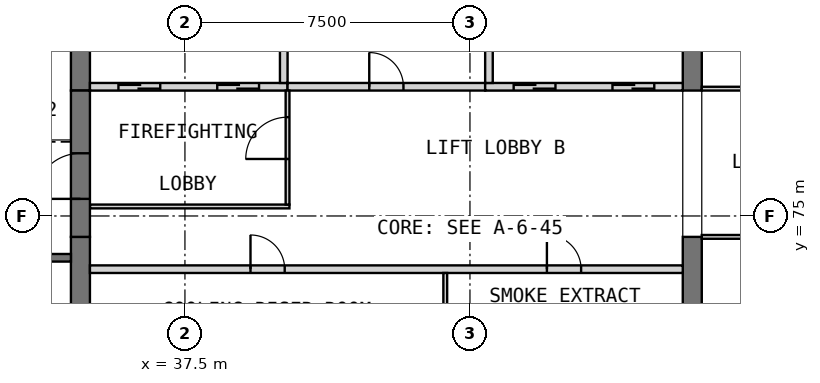
"""IFC4 building model, lengths in metres.
Left out: names, types, materials, properties, quantities, classifications, styles, units other than length and angle.
Written with IfcOpenShell. Run it as: python <this file> out.ifc"""

import sys

from ifc_helpers import new_model, si_unit, direction, frame, frame_2d, origin, place, context, subcontext, project, spatial, rectangle, extrude, element, fill, save


model = new_model("IFC4")
c1 = context("Model", 3, precision=1e-05, world=origin(), true_north=direction((0.0, 1.0)))
c2 = subcontext(c1, "Body", "Model", "MODEL_VIEW")
j1 = project(units=[si_unit("LENGTHUNIT", "METRE"), si_unit("PLANEANGLEUNIT", "RADIAN")], contexts=[c1])
p1 = place(None, origin())
s1 = spatial("IfcSite", under=j1, at=p1, CompositionType="ELEMENT")
p2 = place(p1, origin())
s2 = spatial("IfcBuilding", under=s1, at=p2, CompositionType="ELEMENT")
p3 = place(p2, frame((0.0, 0.0, 320.2)))
s3 = spatial("IfcBuildingStorey", under=s2, at=p3, CompositionType="ELEMENT", Elevation=320.2)
p4 = place(p3, frame((34.75, 68.05, 0.0), z_axis=(0.0, 0.0, 1.0), x_axis=(0.0, 1.0, 0.0)))
e1 = element("IfcWall", 1, at=p4, inside=s3, PredefinedType="SHEAR", context=c2, shape_type="SweptSolid", body=[
    extrude(rectangle(XDim=6.4, YDim=0.5, at=frame_2d((3.2, 0.0))), origin(), (0.0, 0.0, 1.0), 7.7),
])
p5 = place(p3, frame((34.75, 78.3, 0.0), z_axis=(0.0, 0.0, 1.0), x_axis=(0.0, 1.0, 0.0)))
e2 = element("IfcWall", 2, at=p5, inside=s3, PredefinedType="SHEAR", context=c2, shape_type="SweptSolid", body=[
    extrude(rectangle(XDim=3.6, YDim=0.5, at=frame_2d((1.8, 0.0))), origin(), (0.0, 0.0, 1.0), 7.7),
])
p6 = place(p3, frame((50.85, 68.05, 0.0), z_axis=(0.0, 0.0, 1.0), x_axis=(0.0, 1.0, 0.0)))
e3 = element("IfcWall", 3, at=p6, inside=s3, PredefinedType="SHEAR", context=c2, shape_type="SweptSolid", body=[
    extrude(rectangle(XDim=6.4, YDim=0.5, at=frame_2d((3.2, 0.0))), origin(), (0.0, 0.0, 1.0), 7.7),
])
p7 = place(p3, frame((50.85, 78.3, 0.0), z_axis=(0.0, 0.0, 1.0), x_axis=(0.0, 1.0, 0.0)))
e4 = element("IfcWall", 4, at=p7, inside=s3, PredefinedType="SHEAR", context=c2, shape_type="SweptSolid", body=[
    extrude(rectangle(XDim=3.6, YDim=0.5, at=frame_2d((1.8, 0.0))), origin(), (0.0, 0.0, 1.0), 7.7),
])
p8 = place(p3, frame((35.0, 73.6, 0.0), z_axis=(0.0, 0.0, 1.0), x_axis=(1.0, 0.0, 0.0)))
e5 = element("IfcWall", 5, at=p8, inside=s3, PredefinedType="PARTITIONING", context=c2, shape_type="SweptSolid", body=[
    extrude(rectangle(XDim=15.6, YDim=0.2, at=frame_2d((7.8, 0.0))), origin(), (0.0, 0.0, 1.0), 7.7),
])
p9 = place(p8, frame((4.225, 0.0, 0.0)))
e6 = element("IfcOpeningElement", 6, at=p9, cuts=e5, PredefinedType="OPENING", context=c2, shape_type="SweptSolid", body=[
    extrude(rectangle(XDim=0.9, YDim=2.1, at=frame_2d((0.45, 1.05))), frame((0.0, 0.11, 0.0), z_axis=(0.0, -1.0, 0.0), x_axis=(1.0, 0.0, 0.0)), (0.0, 0.0, 1.0), 0.22),
])
p10 = place(p8, frame((12.025, 0.0, 0.0)))
e7 = element("IfcOpeningElement", 7, at=p10, cuts=e5, PredefinedType="OPENING", context=c2, shape_type="SweptSolid", body=[
    extrude(rectangle(XDim=0.9, YDim=2.1, at=frame_2d((0.45, 1.05))), frame((0.0, 0.11, 0.0), z_axis=(0.0, -1.0, 0.0), x_axis=(1.0, 0.0, 0.0)), (0.0, 0.0, 1.0), 0.22),
])
p11 = place(p3, frame((44.35, 71.5, 0.0), z_axis=(0.0, 0.0, 1.0), x_axis=(0.0, 1.0, 0.0)))
e8 = element("IfcWall", 8, at=p11, inside=s3, PredefinedType="PARTITIONING", context=c2, shape_type="SweptSolid", body=[
    extrude(rectangle(XDim=2.0, YDim=0.1, at=frame_2d((1.0, 0.0))), origin(), (0.0, 0.0, 1.0), 7.7),
])
p12 = place(p3, frame((35.0, 78.4, 0.0), z_axis=(0.0, 0.0, 1.0), x_axis=(1.0, 0.0, 0.0)))
e9 = element("IfcWall", 9, at=p12, inside=s3, PredefinedType="SOLIDWALL", context=c2, shape_type="SweptSolid", body=[
    extrude(rectangle(XDim=5.2, YDim=0.2, at=frame_2d((2.6, 0.0))), origin(), (0.0, 0.0, 1.0), 8.0),
])
p13 = place(p12, frame((0.75, 0.0, 0.0)))
e10 = element("IfcOpeningElement", 10, at=p13, cuts=e9, PredefinedType="OPENING", context=c2, shape_type="SweptSolid", body=[
    extrude(rectangle(XDim=1.1, YDim=2.1, at=frame_2d((0.55, 1.05))), frame((0.0, 0.11, 0.0), z_axis=(0.0, -1.0, 0.0), x_axis=(1.0, 0.0, 0.0)), (0.0, 0.0, 1.0), 0.22),
])
p14 = place(p12, frame((3.35, 0.0, 0.0)))
e11 = element("IfcOpeningElement", 11, at=p14, cuts=e9, PredefinedType="OPENING", context=c2, shape_type="SweptSolid", body=[
    extrude(rectangle(XDim=1.1, YDim=2.1, at=frame_2d((0.55, 1.05))), frame((0.0, 0.11, 0.0), z_axis=(0.0, -1.0, 0.0), x_axis=(1.0, 0.0, 0.0)), (0.0, 0.0, 1.0), 0.22),
])
p15 = place(p3, frame((40.1, 78.5, 0.0), z_axis=(0.0, 0.0, 1.0), x_axis=(0.0, 1.0, 0.0)))
e12 = element("IfcWall", 12, at=p15, inside=s3, PredefinedType="SOLIDWALL", context=c2, shape_type="SweptSolid", body=[
    extrude(rectangle(XDim=3.4, YDim=0.2, at=frame_2d((1.7, 0.0))), origin(), (0.0, 0.0, 1.0), 8.0),
])
p16 = place(p3, frame((40.2, 78.4, 0.0), z_axis=(0.0, 0.0, 1.0), x_axis=(1.0, 0.0, 0.0)))
e13 = element("IfcWall", 13, at=p16, inside=s3, PredefinedType="PARTITIONING", context=c2, shape_type="SweptSolid", body=[
    extrude(rectangle(XDim=5.2, YDim=0.2, at=frame_2d((2.6, 0.0))), origin(), (0.0, 0.0, 1.0), 7.7),
])
p17 = place(p16, frame((2.15, 0.0, 0.0)))
e14 = element("IfcOpeningElement", 14, at=p17, cuts=e13, PredefinedType="OPENING", context=c2, shape_type="SweptSolid", body=[
    extrude(rectangle(XDim=0.9, YDim=2.1, at=frame_2d((0.45, 1.05))), frame((0.0, 0.11, 0.0), z_axis=(0.0, -1.0, 0.0), x_axis=(1.0, 0.0, 0.0)), (0.0, 0.0, 1.0), 0.22),
])
p18 = place(p3, frame((45.4, 78.4, 0.0), z_axis=(0.0, 0.0, 1.0), x_axis=(1.0, 0.0, 0.0)))
e15 = element("IfcWall", 15, at=p18, inside=s3, PredefinedType="SOLIDWALL", context=c2, shape_type="SweptSolid", body=[
    extrude(rectangle(XDim=5.2, YDim=0.2, at=frame_2d((2.6, 0.0))), origin(), (0.0, 0.0, 1.0), 8.0),
])
p19 = place(p18, frame((0.75, 0.0, 0.0)))
e16 = element("IfcOpeningElement", 16, at=p19, cuts=e15, PredefinedType="OPENING", context=c2, shape_type="SweptSolid", body=[
    extrude(rectangle(XDim=1.1, YDim=2.1, at=frame_2d((0.55, 1.05))), frame((0.0, 0.11, 0.0), z_axis=(0.0, -1.0, 0.0), x_axis=(1.0, 0.0, 0.0)), (0.0, 0.0, 1.0), 0.22),
])
p20 = place(p18, frame((3.35, 0.0, 0.0)))
e17 = element("IfcOpeningElement", 17, at=p20, cuts=e15, PredefinedType="OPENING", context=c2, shape_type="SweptSolid", body=[
    extrude(rectangle(XDim=1.1, YDim=2.1, at=frame_2d((0.55, 1.05))), frame((0.0, 0.11, 0.0), z_axis=(0.0, -1.0, 0.0), x_axis=(1.0, 0.0, 0.0)), (0.0, 0.0, 1.0), 0.22),
])
p21 = place(p3, frame((45.5, 78.5, 0.0), z_axis=(0.0, 0.0, 1.0), x_axis=(0.0, 1.0, 0.0)))
e18 = element("IfcWall", 18, at=p21, inside=s3, PredefinedType="SOLIDWALL", context=c2, shape_type="SweptSolid", body=[
    extrude(rectangle(XDim=3.4, YDim=0.2, at=frame_2d((1.7, 0.0))), origin(), (0.0, 0.0, 1.0), 8.0),
])
p22 = place(p3, frame((35.0, 75.25, 0.0), z_axis=(0.0, 0.0, 1.0), x_axis=(1.0, 0.0, 0.0)))
e19 = element("IfcWall", 19, at=p22, inside=s3, PredefinedType="PARTITIONING", context=c2, shape_type="SweptSolid", body=[
    extrude(rectangle(XDim=5.25, YDim=0.1, at=frame_2d((2.625, 0.0))), origin(), (0.0, 0.0, 1.0), 7.7),
])
p23 = place(p3, frame((40.2, 75.3, 0.0), z_axis=(0.0, 0.0, 1.0), x_axis=(0.0, 1.0, 0.0)))
e20 = element("IfcWall", 20, at=p23, inside=s3, PredefinedType="PARTITIONING", context=c2, shape_type="SweptSolid", body=[
    extrude(rectangle(XDim=3.0, YDim=0.1, at=frame_2d((1.5, 0.0))), origin(), (0.0, 0.0, 1.0), 7.7),
])
p24 = place(p23, frame((1.2, 0.0, 0.0)))
e21 = element("IfcOpeningElement", 21, at=p24, cuts=e20, PredefinedType="OPENING", context=c2, shape_type="SweptSolid", body=[
    extrude(rectangle(XDim=1.1, YDim=2.1, at=frame_2d((0.55, 1.05))), frame((0.0, 0.06, 0.0), z_axis=(0.0, -1.0, 0.0), x_axis=(1.0, 0.0, 0.0)), (0.0, 0.0, 1.0), 0.12),
])
p25 = place(p3, frame((34.75, 74.45, 0.0), z_axis=(0.0, 0.0, 1.0), x_axis=(0.0, 1.0, 0.0)))
e22 = element("IfcWall", 22, at=p25, inside=s3, PredefinedType="SOLIDWALL", context=c2, shape_type="SweptSolid", body=[
    extrude(rectangle(XDim=3.85, YDim=0.5, at=frame_2d((1.925, 0.0))), origin(), (0.0, 0.0, 1.0), 6.5),
])
p26 = place(p25, frame((1.0, 0.0, 0.0)))
e23 = element("IfcOpeningElement", 23, at=p26, cuts=e22, PredefinedType="OPENING", context=c2, shape_type="SweptSolid", body=[
    extrude(rectangle(XDim=1.2, YDim=2.1, at=frame_2d((0.6, 1.05))), frame((0.0, 0.26, 0.0), z_axis=(0.0, -1.0, 0.0), x_axis=(1.0, 0.0, 0.0)), (0.0, 0.0, 1.0), 0.52),
])
p27 = place(p3, frame((30.6, 73.9, 0.0), z_axis=(0.0, 0.0, 1.0), x_axis=(1.0, 0.0, 0.0)))
e24 = element("IfcWall", 24, at=p27, inside=s3, PredefinedType="SOLIDWALL", context=c2, shape_type="SweptSolid", body=[
    extrude(rectangle(XDim=3.9, YDim=0.2, at=frame_2d((1.95, 0.0))), origin(), (0.0, 0.0, 1.0), 7.7),
])
p28 = place(p27, frame((1.7, 0.0, 0.0)))
e25 = element("IfcOpeningElement", 25, at=p28, cuts=e24, PredefinedType="OPENING", context=c2, shape_type="SweptSolid", body=[
    extrude(rectangle(XDim=0.9, YDim=2.1, at=frame_2d((0.45, 1.05))), frame((0.0, 0.11, 0.0), z_axis=(0.0, -1.0, 0.0), x_axis=(1.0, 0.0, 0.0)), (0.0, 0.0, 1.0), 0.22),
])
p29 = place(p3, frame((51.1, 74.45, 0.0), z_axis=(0.0, 0.0, 1.0), x_axis=(1.0, 0.0, 0.0)))
e26 = element("IfcWall", 26, at=p29, inside=s3, PredefinedType="PARTITIONING", context=c2, shape_type="SweptSolid", body=[
    extrude(rectangle(XDim=8.3, YDim=0.1, at=frame_2d((4.15, 0.0))), origin(), (0.0, 0.0, 1.0), 7.7),
])
p30 = place(p29, frame((3.7, 0.0, 0.0)))
e27 = element("IfcOpeningElement", 27, at=p30, cuts=e26, PredefinedType="OPENING", context=c2, shape_type="SweptSolid", body=[
    extrude(rectangle(XDim=0.9, YDim=2.1, at=frame_2d((0.45, 1.05))), frame((0.0, 0.06, 0.0), z_axis=(0.0, -1.0, 0.0), x_axis=(1.0, 0.0, 0.0)), (0.0, 0.0, 1.0), 0.12),
])
p31 = place(p3, frame((51.1, 78.35, 0.0), z_axis=(0.0, 0.0, 1.0), x_axis=(1.0, 0.0, 0.0)))
e28 = element("IfcWall", 28, at=p31, inside=s3, PredefinedType="PARTITIONING", context=c2, shape_type="SweptSolid", body=[
    extrude(rectangle(XDim=8.3, YDim=0.1, at=frame_2d((4.15, 0.0))), origin(), (0.0, 0.0, 1.0), 7.7),
])
p32 = place(p31, frame((2.05, 0.0, 0.0)))
e29 = element("IfcOpeningElement", 29, at=p32, cuts=e28, PredefinedType="OPENING", context=c2, shape_type="SweptSolid", body=[
    extrude(rectangle(XDim=0.9, YDim=2.1, at=frame_2d((0.45, 1.05))), frame((0.0, 0.06, 0.0), z_axis=(0.0, -1.0, 0.0), x_axis=(1.0, 0.0, 0.0)), (0.0, 0.0, 1.0), 0.12),
])
p33 = place(p31, frame((6.2, 0.0, 0.0)))
e30 = element("IfcOpeningElement", 30, at=p33, cuts=e28, PredefinedType="OPENING", context=c2, shape_type="SweptSolid", body=[
    extrude(rectangle(XDim=0.9, YDim=2.1, at=frame_2d((0.45, 1.05))), frame((0.0, 0.06, 0.0), z_axis=(0.0, -1.0, 0.0), x_axis=(1.0, 0.0, 0.0)), (0.0, 0.0, 1.0), 0.12),
])
p34 = place(p9, origin())
e31 = element("IfcDoor", 31, at=p34, inside=s3, OperationType="SINGLE_SWING_RIGHT", PredefinedType="DOOR", context=c2, shape_type="SweptSolid", body=[
    extrude(rectangle(XDim=0.9, YDim=2.1, at=frame_2d((0.45, 1.05))), frame((0.0, 0.025, 0.0), z_axis=(0.0, -1.0, 0.0), x_axis=(1.0, 0.0, 0.0)), (0.0, 0.0, 1.0), 0.05),
])
fill(e6, e31)
p35 = place(p10, origin())
e32 = element("IfcDoor", 32, at=p35, inside=s3, OperationType="SINGLE_SWING_LEFT", PredefinedType="DOOR", context=c2, shape_type="SweptSolid", body=[
    extrude(rectangle(XDim=0.9, YDim=2.1, at=frame_2d((0.45, 1.05))), frame((0.0, 0.025, 0.0), z_axis=(0.0, -1.0, 0.0), x_axis=(1.0, 0.0, 0.0)), (0.0, 0.0, 1.0), 0.05),
])
fill(e7, e32)
p36 = place(p13, origin())
e33 = element("IfcDoor", 33, at=p36, inside=s3, OperationType="DOUBLE_DOOR_SLIDING", PredefinedType="DOOR", context=c2, shape_type="SweptSolid", body=[
    extrude(rectangle(XDim=1.1, YDim=2.1, at=frame_2d((0.55, 1.05))), frame((0.0, 0.025, 0.0), z_axis=(0.0, -1.0, 0.0), x_axis=(1.0, 0.0, 0.0)), (0.0, 0.0, 1.0), 0.05),
])
fill(e10, e33)
p37 = place(p14, origin())
e34 = element("IfcDoor", 34, at=p37, inside=s3, OperationType="DOUBLE_DOOR_SLIDING", PredefinedType="DOOR", context=c2, shape_type="SweptSolid", body=[
    extrude(rectangle(XDim=1.1, YDim=2.1, at=frame_2d((0.55, 1.05))), frame((0.0, 0.025, 0.0), z_axis=(0.0, -1.0, 0.0), x_axis=(1.0, 0.0, 0.0)), (0.0, 0.0, 1.0), 0.05),
])
fill(e11, e34)
p38 = place(p17, origin())
e35 = element("IfcDoor", 35, at=p38, inside=s3, OperationType="SINGLE_SWING_RIGHT", PredefinedType="DOOR", context=c2, shape_type="SweptSolid", body=[
    extrude(rectangle(XDim=0.9, YDim=2.1, at=frame_2d((0.45, 1.05))), frame((0.0, 0.025, 0.0), z_axis=(0.0, -1.0, 0.0), x_axis=(1.0, 0.0, 0.0)), (0.0, 0.0, 1.0), 0.05),
])
fill(e14, e35)
p39 = place(p19, origin())
e36 = element("IfcDoor", 36, at=p39, inside=s3, OperationType="DOUBLE_DOOR_SLIDING", PredefinedType="DOOR", context=c2, shape_type="SweptSolid", body=[
    extrude(rectangle(XDim=1.1, YDim=2.1, at=frame_2d((0.55, 1.05))), frame((0.0, 0.025, 0.0), z_axis=(0.0, -1.0, 0.0), x_axis=(1.0, 0.0, 0.0)), (0.0, 0.0, 1.0), 0.05),
])
fill(e16, e36)
p40 = place(p20, origin())
e37 = element("IfcDoor", 37, at=p40, inside=s3, OperationType="DOUBLE_DOOR_SLIDING", PredefinedType="DOOR", context=c2, shape_type="SweptSolid", body=[
    extrude(rectangle(XDim=1.1, YDim=2.1, at=frame_2d((0.55, 1.05))), frame((0.0, 0.025, 0.0), z_axis=(0.0, -1.0, 0.0), x_axis=(1.0, 0.0, 0.0)), (0.0, 0.0, 1.0), 0.05),
])
fill(e17, e37)
p41 = place(p24, origin())
e38 = element("IfcDoor", 38, at=p41, inside=s3, OperationType="SINGLE_SWING_LEFT", PredefinedType="DOOR", context=c2, shape_type="SweptSolid", body=[
    extrude(rectangle(XDim=1.1, YDim=2.1, at=frame_2d((0.55, 1.05))), frame((0.0, 0.025, 0.0), z_axis=(0.0, -1.0, 0.0), x_axis=(1.0, 0.0, 0.0)), (0.0, 0.0, 1.0), 0.05),
])
fill(e21, e38)
p42 = place(p26, origin())
e39 = element("IfcDoor", 39, at=p42, inside=s3, OperationType="SINGLE_SWING_RIGHT", PredefinedType="DOOR", context=c2, shape_type="SweptSolid", body=[
    extrude(rectangle(XDim=1.2, YDim=2.1, at=frame_2d((0.6, 1.05))), frame((0.0, 0.025, 0.0), z_axis=(0.0, -1.0, 0.0), x_axis=(1.0, 0.0, 0.0)), (0.0, 0.0, 1.0), 0.05),
])
fill(e23, e39)
save(model, sys.argv[1])
